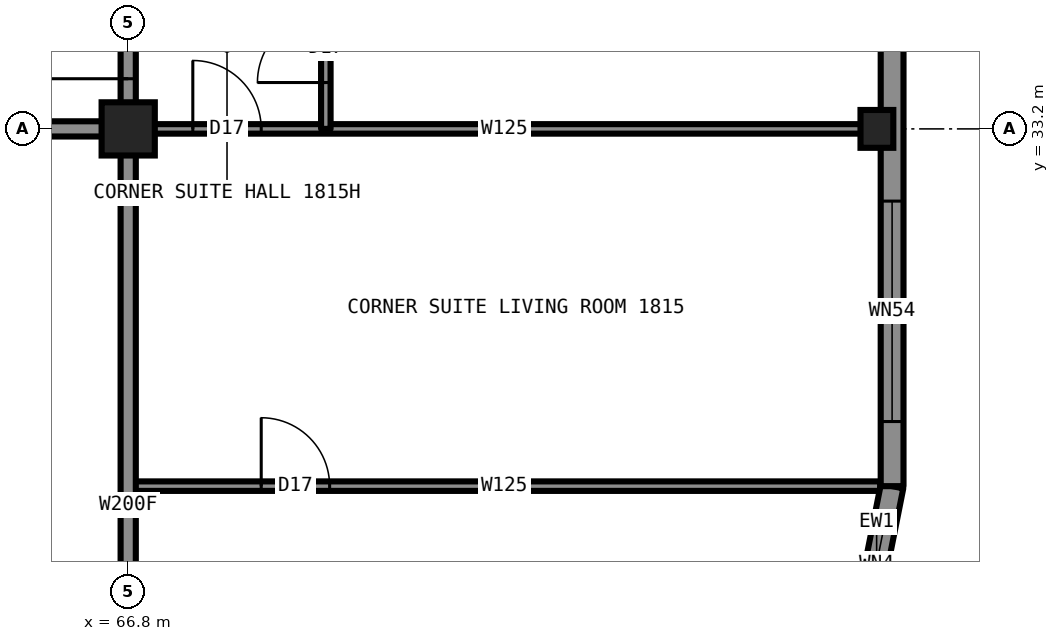
"""IFC4 building model, lengths in metres.
Left out: names, types, materials, properties, quantities, classifications, styles, units other than length and angle.
Written with IfcOpenShell. Run it as: python <this file> out.ifc"""

import sys

from ifc_helpers import new_model, si_unit, direction, frame, frame_2d, origin, origin_2d, place, context, subcontext, project, spatial, rectangle, hollow_rectangle, i_section, extrude, element, fill, save


model = new_model("IFC4")
c1 = context("Model", 3, precision=1e-05, world=origin(), true_north=direction((0.0, 1.0)))
c2 = subcontext(c1, "Body", "Model", "MODEL_VIEW")
j1 = project(units=[si_unit("LENGTHUNIT", "METRE"), si_unit("PLANEANGLEUNIT", "RADIAN")], contexts=[c1])
p1 = place(None, origin())
s1 = spatial("IfcSite", under=j1, at=p1, CompositionType="ELEMENT")
p2 = place(p1, origin())
s2 = spatial("IfcBuilding", under=s1, at=p2, CompositionType="ELEMENT")
p3 = place(p2, frame((0.0, 0.0, 70.5)))
s3 = spatial("IfcBuildingStorey", under=s2, at=p3, CompositionType="ELEMENT", Elevation=70.5)
p4 = place(p3, frame((76.65, 33.2, 0.0), z_axis=(0.0, 0.0, 1.0), x_axis=(1.0, 0.0, 0.0)))
e1 = element("IfcColumn", 1, at=p4, inside=s3, PredefinedType="COLUMN", context=c2, shape_type="SweptSolid", body=[
    extrude(i_section(OverallWidth=0.432, OverallDepth=0.498, WebThickness=0.056, FlangeThickness=0.089, at=origin_2d()), origin(), (0.0, 0.0, 1.0), 3.5),
])
p5 = place(p3, frame((66.8, 33.2, 0.0), z_axis=(0.0, 0.0, 1.0), x_axis=(1.0, 0.0, 0.0)))
e2 = element("IfcColumn", 2, at=p5, inside=s3, PredefinedType="COLUMN", context=c2, shape_type="SweptSolid", body=[
    extrude(hollow_rectangle(XDim=0.7, YDim=0.7, WallThickness=0.06, at=origin_2d()), origin(), (0.0, 0.0, 1.0), 3.5),
])
p6 = place(p3, frame((43.2, 33.2, 0.0), z_axis=(0.0, 0.0, 1.0), x_axis=(1.0, 0.0, 0.0)))
e3 = element("IfcWall", 3, at=p6, inside=s3, PredefinedType="PARTITIONING", context=c2, shape_type="SweptSolid", body=[
    extrude(rectangle(XDim=23.6, YDim=0.2, at=frame_2d((11.8, 0.0))), origin(), (0.0, 0.0, 1.0), 3.33),
])
p7 = place(p6, frame((2.55, 0.0, 0.0)))
e4 = element("IfcOpeningElement", 4, at=p7, cuts=e3, PredefinedType="OPENING", context=c2, shape_type="SweptSolid", body=[
    extrude(rectangle(XDim=1.0, YDim=2.2, at=frame_2d((0.5, 1.1))), frame((0.0, 0.11, 0.0), z_axis=(0.0, -1.0, 0.0), x_axis=(1.0, 0.0, 0.0)), (0.0, 0.0, 1.0), 0.22),
])
p8 = place(p6, frame((5.12, 0.0, 0.0)))
e5 = element("IfcOpeningElement", 5, at=p8, cuts=e3, PredefinedType="OPENING", context=c2, shape_type="SweptSolid", body=[
    extrude(rectangle(XDim=1.0, YDim=2.2, at=frame_2d((0.5, 1.1))), frame((0.0, 0.11, 0.0), z_axis=(0.0, -1.0, 0.0), x_axis=(1.0, 0.0, 0.0)), (0.0, 0.0, 1.0), 0.22),
])
p9 = place(p6, frame((11.7, 0.0, 0.0)))
e6 = element("IfcOpeningElement", 6, at=p9, cuts=e3, PredefinedType="OPENING", context=c2, shape_type="SweptSolid", body=[
    extrude(rectangle(XDim=1.0, YDim=2.2, at=frame_2d((0.5, 1.1))), frame((0.0, 0.11, 0.0), z_axis=(0.0, -1.0, 0.0), x_axis=(1.0, 0.0, 0.0)), (0.0, 0.0, 1.0), 0.22),
])
p10 = place(p6, frame((16.42, 0.0, 0.0)))
e7 = element("IfcOpeningElement", 7, at=p10, cuts=e3, PredefinedType="OPENING", context=c2, shape_type="SweptSolid", body=[
    extrude(rectangle(XDim=1.0, YDim=2.2, at=frame_2d((0.5, 1.1))), frame((0.0, 0.11, 0.0), z_axis=(0.0, -1.0, 0.0), x_axis=(1.0, 0.0, 0.0)), (0.0, 0.0, 1.0), 0.22),
])
p11 = place(p6, frame((21.43, 0.0, 0.0)))
e8 = element("IfcOpeningElement", 8, at=p11, cuts=e3, PredefinedType="OPENING", context=c2, shape_type="SweptSolid", body=[
    extrude(rectangle(XDim=1.0, YDim=2.2, at=frame_2d((0.5, 1.1))), frame((0.0, 0.11, 0.0), z_axis=(0.0, -1.0, 0.0), x_axis=(1.0, 0.0, 0.0)), (0.0, 0.0, 1.0), 0.22),
])
p12 = place(p3, frame((66.8, 33.2, 0.0), z_axis=(0.0, 0.0, 1.0), x_axis=(1.0, 0.0, 0.0)))
e9 = element("IfcWall", 9, at=p12, inside=s3, PredefinedType="PARTITIONING", context=c2, shape_type="SweptSolid", body=[
    extrude(rectangle(XDim=9.9, YDim=0.125, at=frame_2d((4.95, 0.0))), origin(), (0.0, 0.0, 1.0), 2.573),
])
p13 = place(p12, frame((0.85, 0.0, 0.0)))
e10 = element("IfcOpeningElement", 10, at=p13, cuts=e9, PredefinedType="OPENING", context=c2, shape_type="SweptSolid", body=[
    extrude(rectangle(XDim=0.9, YDim=2.2, at=frame_2d((0.45, 1.1))), frame((0.0, 0.073, 0.0), z_axis=(0.0, -1.0, 0.0), x_axis=(1.0, 0.0, 0.0)), (0.0, 0.0, 1.0), 0.145),
])
p14 = place(p3, frame((66.8, 28.5, 0.0), z_axis=(0.0, 0.0, 1.0), x_axis=(1.0, 0.0, 0.0)))
e11 = element("IfcWall", 11, at=p14, inside=s3, PredefinedType="PARTITIONING", context=c2, shape_type="SweptSolid", body=[
    extrude(rectangle(XDim=9.894, YDim=0.125, at=frame_2d((4.947, 0.0))), origin(), (0.0, 0.0, 1.0), 3.33),
])
p15 = place(p14, frame((1.75, 0.0, 0.0)))
e12 = element("IfcOpeningElement", 12, at=p15, cuts=e11, PredefinedType="OPENING", context=c2, shape_type="SweptSolid", body=[
    extrude(rectangle(XDim=0.9, YDim=2.2, at=frame_2d((0.45, 1.1))), frame((0.0, 0.073, 0.0), z_axis=(0.0, -1.0, 0.0), x_axis=(1.0, 0.0, 0.0)), (0.0, 0.0, 1.0), 0.145),
])
p16 = place(p3, frame((66.8, 33.2, 0.0), z_axis=(0.0, 0.0, 1.0), x_axis=(0.0, 1.0, 0.0)))
e13 = element("IfcWall", 13, at=p16, inside=s3, PredefinedType="PARTITIONING", context=c2, shape_type="SweptSolid", body=[
    extrude(rectangle(XDim=23.6, YDim=0.2, at=frame_2d((11.8, 0.0))), origin(), (0.0, 0.0, 1.0), 3.33),
])
p17 = place(p16, frame((6.98, 0.0, 0.0)))
e14 = element("IfcOpeningElement", 14, at=p17, cuts=e13, PredefinedType="OPENING", context=c2, shape_type="SweptSolid", body=[
    extrude(rectangle(XDim=1.0, YDim=2.2, at=frame_2d((0.5, 1.1))), frame((0.0, 0.11, 0.0), z_axis=(0.0, -1.0, 0.0), x_axis=(1.0, 0.0, 0.0)), (0.0, 0.0, 1.0), 0.22),
])
p18 = place(p16, frame((12.44, 0.0, 0.0)))
e15 = element("IfcOpeningElement", 15, at=p18, cuts=e13, PredefinedType="OPENING", context=c2, shape_type="SweptSolid", body=[
    extrude(rectangle(XDim=1.0, YDim=2.2, at=frame_2d((0.5, 1.1))), frame((0.0, 0.11, 0.0), z_axis=(0.0, -1.0, 0.0), x_axis=(1.0, 0.0, 0.0)), (0.0, 0.0, 1.0), 0.22),
])
p19 = place(p16, frame((21.85, 0.0, 0.0)))
e16 = element("IfcOpeningElement", 16, at=p19, cuts=e13, PredefinedType="OPENING", context=c2, shape_type="SweptSolid", body=[
    extrude(rectangle(XDim=1.1, YDim=2.2, at=frame_2d((0.55, 1.1))), frame((0.0, 0.11, 0.0), z_axis=(0.0, -1.0, 0.0), x_axis=(1.0, 0.0, 0.0)), (0.0, 0.0, 1.0), 0.22),
])
p20 = place(p16, frame((0.66, 0.0, 0.0)))
e17 = element("IfcOpeningElement", 17, at=p20, cuts=e13, PredefinedType="OPENING", context=c2, shape_type="SweptSolid", body=[
    extrude(rectangle(XDim=1.1, YDim=2.2, at=frame_2d((0.55, 1.1))), frame((0.0, 0.11, 0.0), z_axis=(0.0, -1.0, 0.0), x_axis=(1.0, 0.0, 0.0)), (0.0, 0.0, 1.0), 0.22),
])
p21 = place(p3, frame((66.8, 23.3, 0.0), z_axis=(0.0, 0.0, 1.0), x_axis=(0.0, 1.0, 0.0)))
e18 = element("IfcWall", 18, at=p21, inside=s3, PredefinedType="PARTITIONING", context=c2, shape_type="SweptSolid", body=[
    extrude(rectangle(XDim=9.9, YDim=0.2, at=frame_2d((4.95, 0.0))), origin(), (0.0, 0.0, 1.0), 2.573),
])
p22 = place(p3, frame((69.4, 33.2, 0.0), z_axis=(0.0, 0.0, 1.0), x_axis=(0.0, 1.0, 0.0)))
e19 = element("IfcWall", 19, at=p22, inside=s3, PredefinedType="PARTITIONING", context=c2, shape_type="SweptSolid", body=[
    extrude(rectangle(XDim=2.12, YDim=0.125, at=frame_2d((1.06, 0.0))), origin(), (0.0, 0.0, 1.0), 3.33),
])
p23 = place(p22, frame((0.61, 0.0, 0.0)))
e20 = element("IfcOpeningElement", 20, at=p23, cuts=e19, PredefinedType="OPENING", context=c2, shape_type="SweptSolid", body=[
    extrude(rectangle(XDim=0.9, YDim=2.2, at=frame_2d((0.45, 1.1))), frame((0.0, 0.073, 0.0), z_axis=(0.0, -1.0, 0.0), x_axis=(1.0, 0.0, 0.0)), (0.0, 0.0, 1.0), 0.145),
])
p24 = place(p3, frame((76.443, 26.453, 0.0), z_axis=(0.0, 0.0, 1.0), x_axis=(0.195081421501, 0.980787050784, 0.0)))
e21 = element("IfcWall", 21, at=p24, inside=s3, PredefinedType="SOLIDWALL", context=c2, shape_type="SweptSolid", body=[
    extrude(rectangle(XDim=2.087, YDim=0.3, at=frame_2d((1.044, 0.0))), origin(), (0.0, 0.0, 1.0), 3.33),
])
p25 = place(p24, frame((0.444, 0.0, 0.5)))
e22 = element("IfcOpeningElement", 22, at=p25, cuts=e21, PredefinedType="OPENING", context=c2, shape_type="SweptSolid", body=[
    extrude(rectangle(XDim=1.2, YDim=2.0, at=frame_2d((0.6, 1.0))), frame((0.0, 0.16, 0.0), z_axis=(0.0, -1.0, 0.0), x_axis=(1.0, 0.0, 0.0)), (0.0, 0.0, 1.0), 0.32),
])
p26 = place(p3, frame((76.85, 28.5, 0.0), z_axis=(0.0, 0.0, 1.0), x_axis=(0.0, 1.0, 0.0)))
e23 = element("IfcWall", 23, at=p26, inside=s3, PredefinedType="SOLIDWALL", context=c2, shape_type="SweptSolid", body=[
    extrude(rectangle(XDim=33.0, YDim=0.3, at=frame_2d((16.5, 0.0))), origin(), (0.0, 0.0, 1.0), 2.83),
])
p27 = place(p26, frame((0.85, 0.0, 0.5)))
e24 = element("IfcOpeningElement", 24, at=p27, cuts=e23, PredefinedType="OPENING", context=c2, shape_type="SweptSolid", body=[
    extrude(rectangle(XDim=2.9, YDim=2.0, at=frame_2d((1.45, 1.0))), frame((0.0, 0.16, 0.0), z_axis=(0.0, -1.0, 0.0), x_axis=(1.0, 0.0, 0.0)), (0.0, 0.0, 1.0), 0.32),
])
p28 = place(p26, frame((6.96, 0.0, 0.55)))
e25 = element("IfcOpeningElement", 25, at=p28, cuts=e23, PredefinedType="OPENING", context=c2, shape_type="SweptSolid", body=[
    extrude(rectangle(XDim=1.6, YDim=1.9, at=frame_2d((0.8, 0.95))), frame((0.0, 0.16, 0.0), z_axis=(0.0, -1.0, 0.0), x_axis=(1.0, 0.0, 0.0)), (0.0, 0.0, 1.0), 0.32),
])
p29 = place(p26, frame((10.28, 0.0, 0.5)))
e26 = element("IfcOpeningElement", 26, at=p29, cuts=e23, PredefinedType="OPENING", context=c2, shape_type="SweptSolid", body=[
    extrude(rectangle(XDim=3.0, YDim=2.0, at=frame_2d((1.5, 1.0))), frame((0.0, 0.16, 0.0), z_axis=(0.0, -1.0, 0.0), x_axis=(1.0, 0.0, 0.0)), (0.0, 0.0, 1.0), 0.32),
])
p30 = place(p26, frame((15.0, 0.0, 0.5)))
e27 = element("IfcOpeningElement", 27, at=p30, cuts=e23, PredefinedType="OPENING", context=c2, shape_type="SweptSolid", body=[
    extrude(rectangle(XDim=3.0, YDim=2.0, at=frame_2d((1.5, 1.0))), frame((0.0, 0.16, 0.0), z_axis=(0.0, -1.0, 0.0), x_axis=(1.0, 0.0, 0.0)), (0.0, 0.0, 1.0), 0.32),
])
p31 = place(p26, frame((19.72, 0.0, 0.5)))
e28 = element("IfcOpeningElement", 28, at=p31, cuts=e23, PredefinedType="OPENING", context=c2, shape_type="SweptSolid", body=[
    extrude(rectangle(XDim=3.0, YDim=2.0, at=frame_2d((1.5, 1.0))), frame((0.0, 0.16, 0.0), z_axis=(0.0, -1.0, 0.0), x_axis=(1.0, 0.0, 0.0)), (0.0, 0.0, 1.0), 0.32),
])
p32 = place(p26, frame((24.44, 0.0, 0.55)))
e29 = element("IfcOpeningElement", 29, at=p32, cuts=e23, PredefinedType="OPENING", context=c2, shape_type="SweptSolid", body=[
    extrude(rectangle(XDim=1.6, YDim=1.9, at=frame_2d((0.8, 0.95))), frame((0.0, 0.16, 0.0), z_axis=(0.0, -1.0, 0.0), x_axis=(1.0, 0.0, 0.0)), (0.0, 0.0, 1.0), 0.32),
])
p33 = place(p26, frame((29.25, 0.0, 0.5)))
e30 = element("IfcOpeningElement", 30, at=p33, cuts=e23, PredefinedType="OPENING", context=c2, shape_type="SweptSolid", body=[
    extrude(rectangle(XDim=2.9, YDim=2.0, at=frame_2d((1.45, 1.0))), frame((0.0, 0.16, 0.0), z_axis=(0.0, -1.0, 0.0), x_axis=(1.0, 0.0, 0.0)), (0.0, 0.0, 1.0), 0.32),
])
p34 = place(p26, frame((6.31, 0.0, 1.45)))
e31 = element("IfcOpeningElement", 31, at=p34, cuts=e23, PredefinedType="OPENING", context=c2, shape_type="SweptSolid", body=[
    extrude(rectangle(XDim=0.6, YDim=1.0, at=frame_2d((0.3, 0.5))), frame((0.0, 0.16, 0.0), z_axis=(0.0, -1.0, 0.0), x_axis=(1.0, 0.0, 0.0)), (0.0, 0.0, 1.0), 0.32),
])
p35 = place(p26, frame((26.04, 0.0, 1.45)))
e32 = element("IfcOpeningElement", 32, at=p35, cuts=e23, PredefinedType="OPENING", context=c2, shape_type="SweptSolid", body=[
    extrude(rectangle(XDim=0.6, YDim=1.0, at=frame_2d((0.3, 0.5))), frame((0.0, 0.16, 0.0), z_axis=(0.0, -1.0, 0.0), x_axis=(1.0, 0.0, 0.0)), (0.0, 0.0, 1.0), 0.32),
])
p36 = place(p13, origin())
e33 = element("IfcDoor", 33, at=p36, inside=s3, OperationType="SINGLE_SWING_LEFT", PredefinedType="DOOR", context=c2, shape_type="SweptSolid", body=[
    extrude(rectangle(XDim=0.9, YDim=2.2, at=frame_2d((0.45, 1.1))), frame((0.0, 0.025, 0.0), z_axis=(0.0, -1.0, 0.0), x_axis=(1.0, 0.0, 0.0)), (0.0, 0.0, 1.0), 0.05),
])
fill(e10, e33)
p37 = place(p20, origin())
e34 = element("IfcDoor", 34, at=p37, inside=s3, OperationType="SINGLE_SWING_LEFT", PredefinedType="DOOR", context=c2, shape_type="SweptSolid", body=[
    extrude(rectangle(XDim=1.1, YDim=2.2, at=frame_2d((0.55, 1.1))), frame((0.0, 0.025, 0.0), z_axis=(0.0, -1.0, 0.0), x_axis=(1.0, 0.0, 0.0)), (0.0, 0.0, 1.0), 0.05),
])
fill(e17, e34)
p38 = place(p15, origin())
e35 = element("IfcDoor", 35, at=p38, inside=s3, OperationType="SINGLE_SWING_LEFT", PredefinedType="DOOR", context=c2, shape_type="SweptSolid", body=[
    extrude(rectangle(XDim=0.9, YDim=2.2, at=frame_2d((0.45, 1.1))), frame((0.0, 0.025, 0.0), z_axis=(0.0, -1.0, 0.0), x_axis=(1.0, 0.0, 0.0)), (0.0, 0.0, 1.0), 0.05),
])
fill(e12, e35)
p39 = place(p23, origin())
e36 = element("IfcDoor", 36, at=p39, inside=s3, OperationType="SINGLE_SWING_LEFT", PredefinedType="DOOR", context=c2, shape_type="SweptSolid", body=[
    extrude(rectangle(XDim=0.9, YDim=2.2, at=frame_2d((0.45, 1.1))), frame((0.0, 0.025, 0.0), z_axis=(0.0, -1.0, 0.0), x_axis=(1.0, 0.0, 0.0)), (0.0, 0.0, 1.0), 0.05),
])
fill(e20, e36)
p40 = place(p25, origin())
e37 = element("IfcWindow", 37, at=p40, inside=s3, PartitioningType="SINGLE_PANEL", PredefinedType="WINDOW", context=c2, shape_type="SweptSolid", body=[
    extrude(rectangle(XDim=1.2, YDim=2.0, at=frame_2d((0.6, 1.0))), frame((0.0, 0.03, 0.0), z_axis=(0.0, -1.0, 0.0), x_axis=(1.0, 0.0, 0.0)), (0.0, 0.0, 1.0), 0.06),
])
fill(e22, e37)
p41 = place(p27, origin())
e38 = element("IfcWindow", 38, at=p41, inside=s3, PartitioningType="SINGLE_PANEL", PredefinedType="WINDOW", context=c2, shape_type="SweptSolid", body=[
    extrude(rectangle(XDim=2.9, YDim=2.0, at=frame_2d((1.45, 1.0))), frame((0.0, 0.03, 0.0), z_axis=(0.0, -1.0, 0.0), x_axis=(1.0, 0.0, 0.0)), (0.0, 0.0, 1.0), 0.06),
])
fill(e24, e38)
save(model, sys.argv[1])
